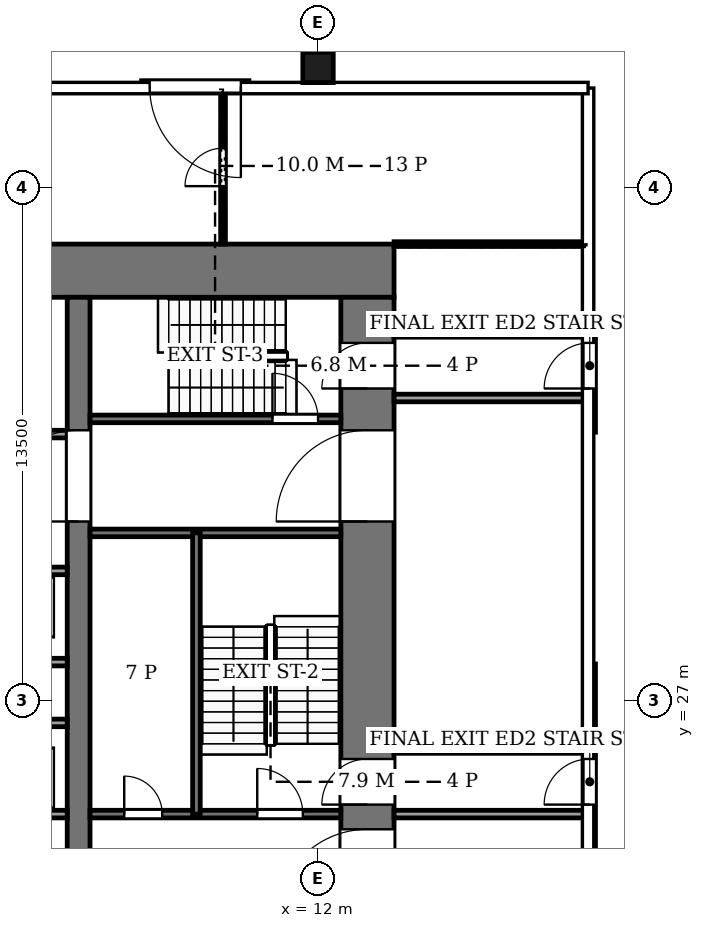
"""IFC4 building model, lengths in metres.
Left out: names, types, materials, properties, quantities, classifications, styles, units other than length and angle.
Written with IfcOpenShell. Run it as: python <this file> out.ifc"""

import sys

from ifc_helpers import new_model, si_unit, direction, frame, frame_2d, origin, origin_2d, place, context, subcontext, project, spatial, rectangle, hollow_rectangle, extrude, element, fill, save


model = new_model("IFC4")
c1 = context("Model", 3, precision=1e-05, world=origin(), true_north=direction((0.0, 1.0)))
c2 = subcontext(c1, "Body", "Model", "MODEL_VIEW")
j1 = project(units=[si_unit("LENGTHUNIT", "METRE"), si_unit("PLANEANGLEUNIT", "RADIAN")], contexts=[c1])
p1 = place(None, origin())
s1 = spatial("IfcSite", under=j1, at=p1, CompositionType="ELEMENT")
p2 = place(p1, origin())
s2 = spatial("IfcBuilding", under=s1, at=p2, CompositionType="ELEMENT")
p3 = place(p2, origin())
s3 = spatial("IfcBuildingStorey", under=s2, at=p3, CompositionType="ELEMENT", Elevation=0.0)
p4 = place(p3, frame((-14.0, 38.3, -0.45), z_axis=(0.0, 0.0, 1.0), x_axis=(1.0, 0.0, 0.0)))
e1 = element("IfcWall", 1, at=p4, inside=s3, PredefinedType="SHEAR", context=c2, shape_type="SweptSolid", body=[
    extrude(rectangle(XDim=28.0, YDim=1.4, at=frame_2d((14.0, 0.0))), origin(), (0.0, 0.0, 1.0), 9.32),
])
p5 = place(p3, frame((13.3, 18.4, -0.45), z_axis=(0.0, 0.0, 1.0), x_axis=(0.0, 1.0, 0.0)))
e2 = element("IfcWall", 2, at=p5, inside=s3, PredefinedType="SHEAR", context=c2, shape_type="SweptSolid", body=[
    extrude(rectangle(XDim=19.2, YDim=1.4, at=frame_2d((9.6, 0.0))), origin(), (0.0, 0.0, 1.0), 9.32),
])
p6 = place(p5, frame((2.8, 0.0, 0.45)))
e3 = element("IfcOpeningElement", 3, at=p6, cuts=e2, PredefinedType="OPENING", context=c2, shape_type="SweptSolid", body=[
    extrude(rectangle(XDim=2.4, YDim=2.4, at=frame_2d((1.2, 1.2))), frame((0.0, 0.71, 0.0), z_axis=(0.0, -1.0, 0.0), x_axis=(1.0, 0.0, 0.0)), (0.0, 0.0, 1.0), 1.42),
])
p7 = place(p5, frame((13.3, 0.0, 0.45)))
e4 = element("IfcOpeningElement", 4, at=p7, cuts=e2, PredefinedType="OPENING", context=c2, shape_type="SweptSolid", body=[
    extrude(rectangle(XDim=2.4, YDim=2.4, at=frame_2d((1.2, 1.2))), frame((0.0, 0.71, 0.0), z_axis=(0.0, -1.0, 0.0), x_axis=(1.0, 0.0, 0.0)), (0.0, 0.0, 1.0), 1.42),
])
p8 = place(p5, frame((5.85, 0.0, 0.45)))
e5 = element("IfcOpeningElement", 5, at=p8, cuts=e2, PredefinedType="OPENING", context=c2, shape_type="SweptSolid", body=[
    extrude(rectangle(XDim=1.2, YDim=2.2, at=frame_2d((0.6, 1.1))), frame((0.0, 0.71, 0.0), z_axis=(0.0, -1.0, 0.0), x_axis=(1.0, 0.0, 0.0)), (0.0, 0.0, 1.0), 1.42),
])
p9 = place(p5, frame((16.8, 0.0, 0.45)))
e6 = element("IfcOpeningElement", 6, at=p9, cuts=e2, PredefinedType="OPENING", context=c2, shape_type="SweptSolid", body=[
    extrude(rectangle(XDim=1.2, YDim=2.2, at=frame_2d((0.6, 1.1))), frame((0.0, 0.71, 0.0), z_axis=(0.0, -1.0, 0.0), x_axis=(1.0, 0.0, 0.0)), (0.0, 0.0, 1.0), 1.42),
])
p10 = place(p3, frame((5.7, 18.4, -0.45), z_axis=(0.0, 0.0, 1.0), x_axis=(0.0, 1.0, 0.0)))
e7 = element("IfcWall", 7, at=p10, inside=s3, PredefinedType="SHEAR", context=c2, shape_type="SweptSolid", body=[
    extrude(rectangle(XDim=19.2, YDim=0.6, at=frame_2d((9.6, 0.0))), origin(), (0.0, 0.0, 1.0), 9.32),
])
p11 = place(p10, frame((13.3, 0.0, 0.45)))
e8 = element("IfcOpeningElement", 8, at=p11, cuts=e7, PredefinedType="OPENING", context=c2, shape_type="SweptSolid", body=[
    extrude(rectangle(XDim=2.4, YDim=2.4, at=frame_2d((1.2, 1.2))), frame((0.0, 0.31, 0.0), z_axis=(0.0, -1.0, 0.0), x_axis=(1.0, 0.0, 0.0)), (0.0, 0.0, 1.0), 0.62),
])
p12 = place(p3, frame((12.0, 43.65, 0.0), z_axis=(0.0, 0.0, 1.0), x_axis=(1.0, 0.0, 0.0)))
e9 = element("IfcColumn", 9, at=p12, inside=s3, PredefinedType="COLUMN", context=c2, shape_type="SweptSolid", body=[
    extrude(hollow_rectangle(XDim=0.8, YDim=0.8, WallThickness=0.04, at=origin_2d()), origin(), (0.0, 0.0, 1.0), 9.0),
])
p13 = place(p3, frame((10.181, 43.15, 0.0), z_axis=(0.0, 0.0, 1.0), x_axis=(-1.0, 0.0, 0.0)))
e10 = element("IfcWall", 10, at=p13, inside=s3, PredefinedType="SOLIDWALL", context=c2, shape_type="SweptSolid", body=[
    extrude(rectangle(XDim=2.823, YDim=0.3, at=frame_2d((1.412, 0.0))), origin(), (0.0, 0.0, 1.0), 3.11),
])
p14 = place(p13, frame((0.211, 0.0, 0.0)))
e11 = element("IfcOpeningElement", 11, at=p14, cuts=e10, PredefinedType="OPENING", context=c2, shape_type="SweptSolid", body=[
    extrude(rectangle(XDim=2.4, YDim=2.7, at=frame_2d((1.2, 1.35))), frame((0.0, 0.16, 0.0), z_axis=(0.0, -1.0, 0.0), x_axis=(1.0, 0.0, 0.0)), (0.0, 0.0, 1.0), 0.32),
])
p15 = place(p3, frame((19.15, 22.05, 0.0), z_axis=(0.0, 0.0, 1.0), x_axis=(0.0, 1.0, 0.0)))
e12 = element("IfcWall", 12, at=p15, inside=s3, PredefinedType="SOLIDWALL", context=c2, shape_type="SweptSolid", body=[
    extrude(rectangle(XDim=5.9, YDim=0.3, at=frame_2d((2.95, 0.0))), origin(), (0.0, 0.0, 1.0), 3.11),
])
p16 = place(p15, frame((2.2, 0.0, 0.0)))
e13 = element("IfcOpeningElement", 13, at=p16, cuts=e12, PredefinedType="OPENING", context=c2, shape_type="SweptSolid", body=[
    extrude(rectangle(XDim=1.2, YDim=2.2, at=frame_2d((0.6, 1.1))), frame((0.0, 0.16, 0.0), z_axis=(0.0, -1.0, 0.0), x_axis=(1.0, 0.0, 0.0)), (0.0, 0.0, 1.0), 0.32),
])
p17 = place(p3, frame((19.15, 34.05, 0.0), z_axis=(0.0, 0.0, 1.0), x_axis=(0.0, 1.0, 0.0)))
e14 = element("IfcWall", 14, at=p17, inside=s3, PredefinedType="SOLIDWALL", context=c2, shape_type="SweptSolid", body=[
    extrude(rectangle(XDim=2.9, YDim=0.3, at=frame_2d((1.45, 0.0))), origin(), (0.0, 0.0, 1.0), 3.11),
])
p18 = place(p17, frame((1.15, 0.0, 0.0)))
e15 = element("IfcOpeningElement", 15, at=p18, cuts=e14, PredefinedType="OPENING", context=c2, shape_type="SweptSolid", body=[
    extrude(rectangle(XDim=1.2, YDim=2.2, at=frame_2d((0.6, 1.1))), frame((0.0, 0.16, 0.0), z_axis=(0.0, -1.0, 0.0), x_axis=(1.0, 0.0, 0.0)), (0.0, 0.0, 1.0), 0.32),
])
p19 = place(p3, frame((-5.4, 24.0, 0.0), z_axis=(0.0, 0.0, 1.0), x_axis=(1.0, 0.0, 0.0)))
e16 = element("IfcWall", 16, at=p19, inside=s3, PredefinedType="PARTITIONING", context=c2, shape_type="SweptSolid", body=[
    extrude(rectangle(XDim=10.8, YDim=0.2, at=frame_2d((5.4, 0.0))), origin(), (0.0, 0.0, 1.0), 8.87),
])
p20 = place(p19, frame((0.75, 0.0, 0.0)))
e17 = element("IfcOpeningElement", 17, at=p20, cuts=e16, PredefinedType="OPENING", context=c2, shape_type="SweptSolid", body=[
    extrude(rectangle(XDim=1.2, YDim=2.2, at=frame_2d((0.6, 1.1))), frame((0.0, 0.11, 0.0), z_axis=(0.0, -1.0, 0.0), x_axis=(1.0, 0.0, 0.0)), (0.0, 0.0, 1.0), 0.22),
])
p21 = place(p19, frame((3.45, 0.0, 0.0)))
e18 = element("IfcOpeningElement", 18, at=p21, cuts=e16, PredefinedType="OPENING", context=c2, shape_type="SweptSolid", body=[
    extrude(rectangle(XDim=1.2, YDim=2.2, at=frame_2d((0.6, 1.1))), frame((0.0, 0.11, 0.0), z_axis=(0.0, -1.0, 0.0), x_axis=(1.0, 0.0, 0.0)), (0.0, 0.0, 1.0), 0.22),
])
p22 = place(p19, frame((6.15, 0.0, 0.0)))
e19 = element("IfcOpeningElement", 19, at=p22, cuts=e16, PredefinedType="OPENING", context=c2, shape_type="SweptSolid", body=[
    extrude(rectangle(XDim=1.2, YDim=2.2, at=frame_2d((0.6, 1.1))), frame((0.0, 0.11, 0.0), z_axis=(0.0, -1.0, 0.0), x_axis=(1.0, 0.0, 0.0)), (0.0, 0.0, 1.0), 0.22),
])
p23 = place(p19, frame((8.85, 0.0, 0.0)))
e20 = element("IfcOpeningElement", 20, at=p23, cuts=e16, PredefinedType="OPENING", context=c2, shape_type="SweptSolid", body=[
    extrude(rectangle(XDim=1.2, YDim=2.2, at=frame_2d((0.6, 1.1))), frame((0.0, 0.11, 0.0), z_axis=(0.0, -1.0, 0.0), x_axis=(1.0, 0.0, 0.0)), (0.0, 0.0, 1.0), 0.22),
])
p24 = place(p3, frame((6.0, 24.0, 0.0), z_axis=(0.0, 0.0, 1.0), x_axis=(1.0, 0.0, 0.0)))
e21 = element("IfcWall", 21, at=p24, inside=s3, PredefinedType="PARTITIONING", context=c2, shape_type="SweptSolid", body=[
    extrude(rectangle(XDim=6.6, YDim=0.2, at=frame_2d((3.3, 0.0))), origin(), (0.0, 0.0, 1.0), 8.87),
])
p25 = place(p24, frame((0.9, 0.0, 0.0)))
e22 = element("IfcOpeningElement", 22, at=p25, cuts=e21, PredefinedType="OPENING", context=c2, shape_type="SweptSolid", body=[
    extrude(rectangle(XDim=1.0, YDim=2.1, at=frame_2d((0.5, 1.05))), frame((0.0, 0.11, 0.0), z_axis=(0.0, -1.0, 0.0), x_axis=(1.0, 0.0, 0.0)), (0.0, 0.0, 1.0), 0.22),
])
p26 = place(p24, frame((4.4, 0.0, 0.0)))
e23 = element("IfcOpeningElement", 23, at=p26, cuts=e21, PredefinedType="OPENING", context=c2, shape_type="SweptSolid", body=[
    extrude(rectangle(XDim=1.2, YDim=2.2, at=frame_2d((0.6, 1.1))), frame((0.0, 0.11, 0.0), z_axis=(0.0, -1.0, 0.0), x_axis=(1.0, 0.0, 0.0)), (0.0, 0.0, 1.0), 0.22),
])
for number, where, z_axis, x_axis in (
    (24, (-5.4, 26.4, 0.0), (0.0, 0.0, 1.0), (1.0, 0.0, 0.0)),
    (25, (-5.4, 28.0, 0.0), (0.0, 0.0, 1.0), (1.0, 0.0, 0.0)),
):
    element("IfcWall", number, at=place(p3, frame(where, z_axis=z_axis, x_axis=x_axis)), inside=s3, PredefinedType="PARTITIONING", context=c2, shape_type="SweptSolid", body=[
        extrude(rectangle(XDim=10.8, YDim=0.2, at=frame_2d((5.4, 0.0))), origin(), (0.0, 0.0, 1.0), 8.87),
    ])
p27 = place(p3, frame((-5.4, 30.4, 0.0), z_axis=(0.0, 0.0, 1.0), x_axis=(1.0, 0.0, 0.0)))
e26 = element("IfcWall", 26, at=p27, inside=s3, PredefinedType="PARTITIONING", context=c2, shape_type="SweptSolid", body=[
    extrude(rectangle(XDim=10.8, YDim=0.2, at=frame_2d((5.4, 0.0))), origin(), (0.0, 0.0, 1.0), 8.87),
])
p28 = place(p27, frame((0.75, 0.0, 0.0)))
e27 = element("IfcOpeningElement", 27, at=p28, cuts=e26, PredefinedType="OPENING", context=c2, shape_type="SweptSolid", body=[
    extrude(rectangle(XDim=1.2, YDim=2.2, at=frame_2d((0.6, 1.1))), frame((0.0, 0.11, 0.0), z_axis=(0.0, -1.0, 0.0), x_axis=(1.0, 0.0, 0.0)), (0.0, 0.0, 1.0), 0.22),
])
p29 = place(p27, frame((3.45, 0.0, 0.0)))
e28 = element("IfcOpeningElement", 28, at=p29, cuts=e26, PredefinedType="OPENING", context=c2, shape_type="SweptSolid", body=[
    extrude(rectangle(XDim=1.2, YDim=2.2, at=frame_2d((0.6, 1.1))), frame((0.0, 0.11, 0.0), z_axis=(0.0, -1.0, 0.0), x_axis=(1.0, 0.0, 0.0)), (0.0, 0.0, 1.0), 0.22),
])
p30 = place(p27, frame((6.15, 0.0, 0.0)))
e29 = element("IfcOpeningElement", 29, at=p30, cuts=e26, PredefinedType="OPENING", context=c2, shape_type="SweptSolid", body=[
    extrude(rectangle(XDim=1.2, YDim=2.2, at=frame_2d((0.6, 1.1))), frame((0.0, 0.11, 0.0), z_axis=(0.0, -1.0, 0.0), x_axis=(1.0, 0.0, 0.0)), (0.0, 0.0, 1.0), 0.22),
])
p31 = place(p27, frame((8.85, 0.0, 0.0)))
e30 = element("IfcOpeningElement", 30, at=p31, cuts=e26, PredefinedType="OPENING", context=c2, shape_type="SweptSolid", body=[
    extrude(rectangle(XDim=1.2, YDim=2.2, at=frame_2d((0.6, 1.1))), frame((0.0, 0.11, 0.0), z_axis=(0.0, -1.0, 0.0), x_axis=(1.0, 0.0, 0.0)), (0.0, 0.0, 1.0), 0.22),
])
p32 = place(p3, frame((6.0, 31.4, 0.0), z_axis=(0.0, 0.0, 1.0), x_axis=(1.0, 0.0, 0.0)))
e31 = element("IfcWall", 31, at=p32, inside=s3, PredefinedType="PARTITIONING", context=c2, shape_type="SweptSolid", body=[
    extrude(rectangle(XDim=6.6, YDim=0.2, at=frame_2d((3.3, 0.0))), origin(), (0.0, 0.0, 1.0), 8.87),
])
p33 = place(p3, frame((-5.4, 34.0, 0.0), z_axis=(0.0, 0.0, 1.0), x_axis=(1.0, 0.0, 0.0)))
e32 = element("IfcWall", 32, at=p33, inside=s3, PredefinedType="PARTITIONING", context=c2, shape_type="SweptSolid", body=[
    extrude(rectangle(XDim=10.8, YDim=0.2, at=frame_2d((5.4, 0.0))), origin(), (0.0, 0.0, 1.0), 8.87),
])
p34 = place(p33, frame((0.75, 0.0, 0.0)))
e33 = element("IfcOpeningElement", 33, at=p34, cuts=e32, PredefinedType="OPENING", context=c2, shape_type="SweptSolid", body=[
    extrude(rectangle(XDim=1.2, YDim=2.2, at=frame_2d((0.6, 1.1))), frame((0.0, 0.11, 0.0), z_axis=(0.0, -1.0, 0.0), x_axis=(1.0, 0.0, 0.0)), (0.0, 0.0, 1.0), 0.22),
])
p35 = place(p33, frame((3.45, 0.0, 0.0)))
e34 = element("IfcOpeningElement", 34, at=p35, cuts=e32, PredefinedType="OPENING", context=c2, shape_type="SweptSolid", body=[
    extrude(rectangle(XDim=1.2, YDim=2.2, at=frame_2d((0.6, 1.1))), frame((0.0, 0.11, 0.0), z_axis=(0.0, -1.0, 0.0), x_axis=(1.0, 0.0, 0.0)), (0.0, 0.0, 1.0), 0.22),
])
p36 = place(p33, frame((6.15, 0.0, 0.0)))
e35 = element("IfcOpeningElement", 35, at=p36, cuts=e32, PredefinedType="OPENING", context=c2, shape_type="SweptSolid", body=[
    extrude(rectangle(XDim=1.2, YDim=2.2, at=frame_2d((0.6, 1.1))), frame((0.0, 0.11, 0.0), z_axis=(0.0, -1.0, 0.0), x_axis=(1.0, 0.0, 0.0)), (0.0, 0.0, 1.0), 0.22),
])
p37 = place(p33, frame((8.95, 0.0, 0.0)))
e36 = element("IfcOpeningElement", 36, at=p37, cuts=e32, PredefinedType="OPENING", context=c2, shape_type="SweptSolid", body=[
    extrude(rectangle(XDim=1.0, YDim=2.1, at=frame_2d((0.5, 1.05))), frame((0.0, 0.11, 0.0), z_axis=(0.0, -1.0, 0.0), x_axis=(1.0, 0.0, 0.0)), (0.0, 0.0, 1.0), 0.22),
])
p38 = place(p3, frame((6.0, 34.4, 0.0), z_axis=(0.0, 0.0, 1.0), x_axis=(1.0, 0.0, 0.0)))
e37 = element("IfcWall", 37, at=p38, inside=s3, PredefinedType="PARTITIONING", context=c2, shape_type="SweptSolid", body=[
    extrude(rectangle(XDim=6.6, YDim=0.2, at=frame_2d((3.3, 0.0))), origin(), (0.0, 0.0, 1.0), 8.87),
])
p39 = place(p38, frame((4.8, 0.0, 0.0)))
e38 = element("IfcOpeningElement", 38, at=p39, cuts=e37, PredefinedType="OPENING", context=c2, shape_type="SweptSolid", body=[
    extrude(rectangle(XDim=1.2, YDim=2.2, at=frame_2d((0.6, 1.1))), frame((0.0, 0.11, 0.0), z_axis=(0.0, -1.0, 0.0), x_axis=(1.0, 0.0, 0.0)), (0.0, 0.0, 1.0), 0.22),
])
p40 = place(p3, frame((8.8, 24.0, 0.0), z_axis=(0.0, 0.0, 1.0), x_axis=(0.0, 1.0, 0.0)))
e39 = element("IfcWall", 39, at=p40, inside=s3, PredefinedType="PARTITIONING", context=c2, shape_type="SweptSolid", body=[
    extrude(rectangle(XDim=7.4, YDim=0.2, at=frame_2d((3.7, 0.0))), origin(), (0.0, 0.0, 1.0), 8.87),
])
for number, where, z_axis, x_axis in (
    (40, (14.0, 24.0, 0.0), (0.0, 0.0, 1.0), (1.0, 0.0, 0.0)),
    (41, (14.0, 25.7, 0.0), (0.0, 0.0, 1.0), (1.0, 0.0, 0.0)),
):
    element("IfcWall", number, at=place(p3, frame(where, z_axis=z_axis, x_axis=x_axis)), inside=s3, PredefinedType="PARTITIONING", context=c2, shape_type="SweptSolid", body=[
        extrude(rectangle(XDim=5.0, YDim=0.2, at=frame_2d((2.5, 0.0))), origin(), (0.0, 0.0, 1.0), 8.75),
    ])
p41 = place(p3, frame((14.0, 34.95, 0.0), z_axis=(0.0, 0.0, 1.0), x_axis=(1.0, 0.0, 0.0)))
e42 = element("IfcWall", 42, at=p41, inside=s3, PredefinedType="PARTITIONING", context=c2, shape_type="SweptSolid", body=[
    extrude(rectangle(XDim=5.0, YDim=0.2, at=frame_2d((2.5, 0.0))), origin(), (0.0, 0.0, 1.0), 8.47),
])
p42 = place(p3, frame((14.0, 36.65, 0.0), z_axis=(0.0, 0.0, 1.0), x_axis=(1.0, 0.0, 0.0)))
e43 = element("IfcWall", 43, at=p42, inside=s3, PredefinedType="PARTITIONING", context=c2, shape_type="SweptSolid", body=[
    extrude(rectangle(XDim=5.0, YDim=0.2, at=frame_2d((2.5, 0.0))), origin(), (0.0, 0.0, 1.0), 8.75),
])
p43 = place(p3, frame((19.05, 39.0, 0.0), z_axis=(0.0, 0.0, 1.0), x_axis=(-1.0, 0.0, 0.0)))
e44 = element("IfcWall", 44, at=p43, inside=s3, PredefinedType="PARTITIONING", context=c2, shape_type="SweptSolid", body=[
    extrude(rectangle(XDim=5.05, YDim=0.125, at=frame_2d((2.525, 0.0))), origin(), (0.0, 0.0, 1.0), 8.14),
])
p44 = place(p3, frame((9.5, 39.0, 0.0), z_axis=(0.0, 0.0, 1.0), x_axis=(0.0, 1.0, 0.0)))
e45 = element("IfcWall", 45, at=p44, inside=s3, PredefinedType="PARTITIONING", context=c2, shape_type="SweptSolid", body=[
    extrude(rectangle(XDim=4.05, YDim=0.125, at=frame_2d((2.025, 0.0))), origin(), (0.0, 0.0, 1.0), 8.87),
])
p45 = place(p44, frame((1.525, 0.0, 0.0)))
e46 = element("IfcOpeningElement", 46, at=p45, cuts=e45, PredefinedType="OPENING", context=c2, shape_type="SweptSolid", body=[
    extrude(rectangle(XDim=1.0, YDim=2.1, at=frame_2d((0.5, 1.05))), frame((0.0, 0.073, 0.0), z_axis=(0.0, -1.0, 0.0), x_axis=(1.0, 0.0, 0.0)), (0.0, 0.0, 1.0), 0.145),
])
p46 = place(p14, origin())
e47 = element("IfcDoor", 47, at=p46, inside=s3, OperationType="DOUBLE_DOOR_SINGLE_SWING", PredefinedType="DOOR", context=c2, shape_type="SweptSolid", body=[
    extrude(rectangle(XDim=2.4, YDim=2.7, at=frame_2d((1.2, 1.35))), frame((0.0, 0.025, 0.0), z_axis=(0.0, -1.0, 0.0), x_axis=(1.0, 0.0, 0.0)), (0.0, 0.0, 1.0), 0.05),
])
fill(e11, e47)
p47 = place(p16, origin())
e48 = element("IfcDoor", 48, at=p47, inside=s3, OperationType="SINGLE_SWING_RIGHT", PredefinedType="DOOR", context=c2, shape_type="SweptSolid", body=[
    extrude(rectangle(XDim=1.2, YDim=2.2, at=frame_2d((0.6, 1.1))), frame((0.0, 0.025, 0.0), z_axis=(0.0, -1.0, 0.0), x_axis=(1.0, 0.0, 0.0)), (0.0, 0.0, 1.0), 0.05),
])
fill(e13, e48)
p48 = place(p18, origin())
e49 = element("IfcDoor", 49, at=p48, inside=s3, OperationType="SINGLE_SWING_LEFT", PredefinedType="DOOR", context=c2, shape_type="SweptSolid", body=[
    extrude(rectangle(XDim=1.2, YDim=2.2, at=frame_2d((0.6, 1.1))), frame((0.0, 0.025, 0.0), z_axis=(0.0, -1.0, 0.0), x_axis=(1.0, 0.0, 0.0)), (0.0, 0.0, 1.0), 0.05),
])
fill(e15, e49)
p49 = place(p25, origin())
e50 = element("IfcDoor", 50, at=p49, inside=s3, OperationType="SINGLE_SWING_LEFT", PredefinedType="DOOR", context=c2, shape_type="SweptSolid", body=[
    extrude(rectangle(XDim=1.0, YDim=2.1, at=frame_2d((0.5, 1.05))), frame((0.0, 0.025, 0.0), z_axis=(0.0, -1.0, 0.0), x_axis=(1.0, 0.0, 0.0)), (0.0, 0.0, 1.0), 0.05),
])
fill(e22, e50)
p50 = place(p26, origin())
e51 = element("IfcDoor", 51, at=p50, inside=s3, OperationType="SINGLE_SWING_LEFT", PredefinedType="DOOR", context=c2, shape_type="SweptSolid", body=[
    extrude(rectangle(XDim=1.2, YDim=2.2, at=frame_2d((0.6, 1.1))), frame((0.0, 0.025, 0.0), z_axis=(0.0, -1.0, 0.0), x_axis=(1.0, 0.0, 0.0)), (0.0, 0.0, 1.0), 0.05),
])
fill(e23, e51)
p51 = place(p39, origin())
e52 = element("IfcDoor", 52, at=p51, inside=s3, OperationType="SINGLE_SWING_RIGHT", PredefinedType="DOOR", context=c2, shape_type="SweptSolid", body=[
    extrude(rectangle(XDim=1.2, YDim=2.2, at=frame_2d((0.6, 1.1))), frame((0.0, 0.025, 0.0), z_axis=(0.0, -1.0, 0.0), x_axis=(1.0, 0.0, 0.0)), (0.0, 0.0, 1.0), 0.05),
])
fill(e38, e52)
p52 = place(p11, origin())
e53 = element("IfcDoor", 53, at=p52, inside=s3, OperationType="DOUBLE_DOOR_SINGLE_SWING", PredefinedType="DOOR", context=c2, shape_type="SweptSolid", body=[
    extrude(rectangle(XDim=2.4, YDim=2.4, at=frame_2d((1.2, 1.2))), frame((0.0, 0.025, 0.0), z_axis=(0.0, -1.0, 0.0), x_axis=(1.0, 0.0, 0.0)), (0.0, 0.0, 1.0), 0.05),
])
fill(e8, e53)
p53 = place(p6, origin())
e54 = element("IfcDoor", 54, at=p53, inside=s3, OperationType="DOUBLE_DOOR_SINGLE_SWING", PredefinedType="DOOR", context=c2, shape_type="SweptSolid", body=[
    extrude(rectangle(XDim=2.4, YDim=2.4, at=frame_2d((1.2, 1.2))), frame((0.0, 0.025, 0.0), z_axis=(0.0, -1.0, 0.0), x_axis=(1.0, 0.0, 0.0)), (0.0, 0.0, 1.0), 0.05),
])
fill(e3, e54)
p54 = place(p7, origin())
e55 = element("IfcDoor", 55, at=p54, inside=s3, OperationType="DOUBLE_DOOR_SINGLE_SWING", PredefinedType="DOOR", context=c2, shape_type="SweptSolid", body=[
    extrude(rectangle(XDim=2.4, YDim=2.4, at=frame_2d((1.2, 1.2))), frame((0.0, 0.025, 0.0), z_axis=(0.0, -1.0, 0.0), x_axis=(1.0, 0.0, 0.0)), (0.0, 0.0, 1.0), 0.05),
])
fill(e4, e55)
p55 = place(p8, origin())
e56 = element("IfcDoor", 56, at=p55, inside=s3, OperationType="SINGLE_SWING_LEFT", PredefinedType="DOOR", context=c2, shape_type="SweptSolid", body=[
    extrude(rectangle(XDim=1.2, YDim=2.2, at=frame_2d((0.6, 1.1))), frame((0.0, 0.7, 0.0), z_axis=(0.0, -1.0, 0.0), x_axis=(1.0, 0.0, 0.0)), (0.0, 0.0, 1.0), 0.05),
])
fill(e5, e56)
p56 = place(p9, origin())
e57 = element("IfcDoor", 57, at=p56, inside=s3, OperationType="SINGLE_SWING_RIGHT", PredefinedType="DOOR", context=c2, shape_type="SweptSolid", body=[
    extrude(rectangle(XDim=1.2, YDim=2.2, at=frame_2d((0.6, 1.1))), frame((0.0, 0.7, 0.0), z_axis=(0.0, -1.0, 0.0), x_axis=(1.0, 0.0, 0.0)), (0.0, 0.0, 1.0), 0.05),
])
fill(e6, e57)
p57 = place(p45, origin())
e58 = element("IfcDoor", 58, at=p57, inside=s3, OperationType="SINGLE_SWING_RIGHT", PredefinedType="DOOR", context=c2, shape_type="SweptSolid", body=[
    extrude(rectangle(XDim=1.0, YDim=2.1, at=frame_2d((0.5, 1.05))), frame((0.0, 0.025, 0.0), z_axis=(0.0, -1.0, 0.0), x_axis=(1.0, 0.0, 0.0)), (0.0, 0.0, 1.0), 0.05),
])
fill(e46, e58)
save(model, sys.argv[1])
